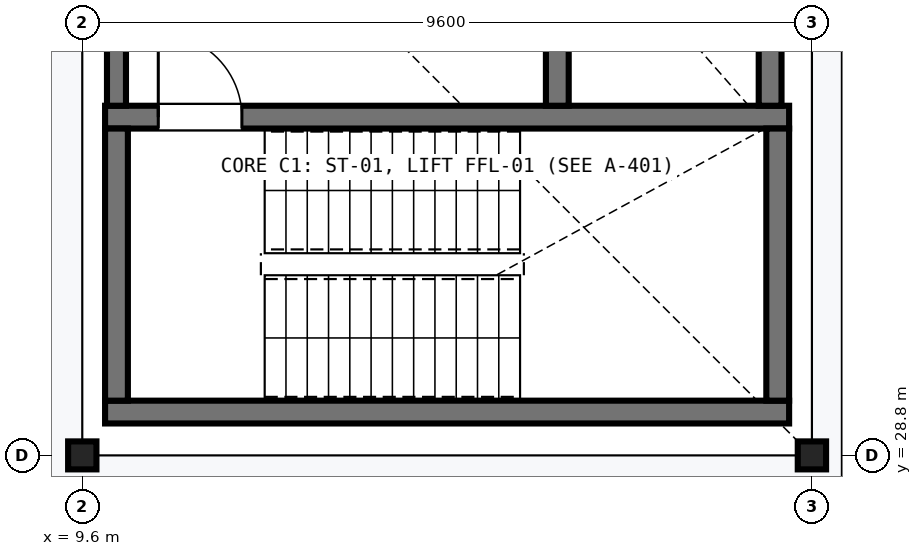
"""IFC4 building model, lengths in metres.
Left out: names, types, materials, properties, quantities, classifications, styles, units other than length and angle.
Written with IfcOpenShell. Run it as: python <this file> out.ifc"""

import sys

from ifc_helpers import new_model, si_unit, direction, frame, frame_2d, origin, origin_2d, place, context, subcontext, project, spatial, rectangle, i_section, extrude, element, fill, save


model = new_model("IFC4")
c1 = context("Model", 3, precision=1e-05, world=origin(), true_north=direction((0.0, 1.0)))
c2 = subcontext(c1, "Body", "Model", "MODEL_VIEW")
j1 = project(units=[si_unit("LENGTHUNIT", "METRE"), si_unit("PLANEANGLEUNIT", "RADIAN")], contexts=[c1])
p1 = place(None, origin())
s1 = spatial("IfcSite", under=j1, at=p1, CompositionType="ELEMENT")
p2 = place(p1, origin())
s2 = spatial("IfcBuilding", under=s1, at=p2, CompositionType="ELEMENT")
p3 = place(p2, frame((0.0, 0.0, 6.0)))
s3 = spatial("IfcBuildingStorey", under=s2, at=p3, CompositionType="ELEMENT", Elevation=6.0)
for number, where, z_axis, x_axis in (
    (1, (9.6, 28.8, 0.0), (0.0, 0.0, 1.0), (1.0, 0.0, 0.0)),
    (2, (19.2, 28.8, 0.0), (0.0, 0.0, 1.0), (1.0, 0.0, 0.0)),
):
    element("IfcColumn", number, at=place(p3, frame(where, z_axis=z_axis, x_axis=x_axis)), inside=s3, PredefinedType="COLUMN", context=c2, shape_type="SweptSolid", body=[
        extrude(i_section(OverallWidth=0.373, OverallDepth=0.368, WebThickness=0.014, FlangeThickness=0.024, FilletRadius=0.015, at=origin_2d()), origin(), (0.0, 0.0, 1.0), 4.25),
    ])
p4 = place(p3, frame((9.9, 29.37, 0.0), z_axis=(0.0, 0.0, 1.0), x_axis=(1.0, 0.0, 0.0)))
e3 = element("IfcWall", 3, at=p4, inside=s3, PredefinedType="SHEAR", context=c2, shape_type="SweptSolid", body=[
    extrude(rectangle(XDim=9.0, YDim=0.3, at=frame_2d((4.5, 0.0))), origin(), (0.0, 0.0, 1.0), 4.25),
])
p5 = place(p3, frame((18.9, 33.25, 0.0), z_axis=(0.0, 0.0, 1.0), x_axis=(-1.0, 0.0, 0.0)))
e4 = element("IfcWall", 4, at=p5, inside=s3, PredefinedType="SHEAR", context=c2, shape_type="SweptSolid", body=[
    extrude(rectangle(XDim=9.0, YDim=0.3, at=frame_2d((4.5, 0.0))), origin(), (0.0, 0.0, 1.0), 4.25),
])
p6 = place(p5, frame((7.2, 0.0, 0.0)))
e5 = element("IfcOpeningElement", 5, at=p6, cuts=e4, PredefinedType="OPENING", context=c2, shape_type="SweptSolid", body=[
    extrude(rectangle(XDim=1.1, YDim=2.15, at=frame_2d((0.55, 1.075))), frame((0.0, 0.16, 0.0), z_axis=(0.0, -1.0, 0.0), x_axis=(1.0, 0.0, 0.0)), (0.0, 0.0, 1.0), 0.32),
])
for number, where, z_axis, x_axis in (
    (6, (10.05, 29.52, 0.0), (0.0, 0.0, 1.0), (0.0, 1.0, 0.0)),
    (7, (18.75, 33.1, 0.0), (0.0, 0.0, 1.0), (0.0, -1.0, 0.0)),
):
    element("IfcWall", number, at=place(p3, frame(where, z_axis=z_axis, x_axis=x_axis)), inside=s3, PredefinedType="SHEAR", context=c2, shape_type="SweptSolid", body=[
        extrude(rectangle(XDim=3.58, YDim=0.3, at=frame_2d((1.79, 0.0))), origin(), (0.0, 0.0, 1.0), 4.25),
    ])
p7 = place(p3, frame((15.85, 36.1, 0.0), z_axis=(0.0, 0.0, 1.0), x_axis=(0.0, -1.0, 0.0)))
e8 = element("IfcWall", 8, at=p7, inside=s3, PredefinedType="SHEAR", context=c2, shape_type="SweptSolid", body=[
    extrude(rectangle(XDim=2.7, YDim=0.3, at=frame_2d((1.35, 0.0))), origin(), (0.0, 0.0, 1.0), 4.25),
])
p8 = place(p7, frame((0.8, 0.0, 0.0)))
e9 = element("IfcOpeningElement", 9, at=p8, cuts=e8, PredefinedType="OPENING", context=c2, shape_type="SweptSolid", body=[
    extrude(rectangle(XDim=1.1, YDim=2.1, at=frame_2d((0.55, 1.05))), frame((0.0, 0.16, 0.0), z_axis=(0.0, -1.0, 0.0), x_axis=(1.0, 0.0, 0.0)), (0.0, 0.0, 1.0), 0.32),
])
p9 = place(p3, frame((18.65, 33.4, 0.0), z_axis=(0.0, 0.0, 1.0), x_axis=(0.0, 1.0, 0.0)))
e10 = element("IfcWall", 10, at=p9, inside=s3, PredefinedType="SHEAR", context=c2, shape_type="SweptSolid", body=[
    extrude(rectangle(XDim=2.7, YDim=0.3, at=frame_2d((1.35, 0.0))), origin(), (0.0, 0.0, 1.0), 4.25),
])
p10 = place(p3, frame((10.05, 33.4, 0.0), z_axis=(0.0, 0.0, 1.0), x_axis=(0.0, 1.0, 0.0)))
e11 = element("IfcWall", 11, at=p10, inside=s3, PredefinedType="SHEAR", context=c2, shape_type="SweptSolid", body=[
    extrude(rectangle(XDim=2.7, YDim=0.25, at=frame_2d((1.35, 0.0))), origin(), (0.0, 0.0, 1.0), 4.25),
])
p11 = place(p10, frame((0.75, 0.0, 0.0)))
e12 = element("IfcOpeningElement", 12, at=p11, cuts=e11, PredefinedType="OPENING", context=c2, shape_type="SweptSolid", body=[
    extrude(rectangle(XDim=1.2, YDim=2.15, at=frame_2d((0.6, 1.075))), frame((0.0, 0.135, 0.0), z_axis=(0.0, -1.0, 0.0), x_axis=(1.0, 0.0, 0.0)), (0.0, 0.0, 1.0), 0.27),
])
p12 = place(p3, frame((19.69, 12.58, 0.0), z_axis=(0.0, 0.0, 1.0), x_axis=(0.0, 1.0, 0.0)))
e13 = element("IfcWall", 13, at=p12, inside=s3, PredefinedType="PARTITIONING", context=c2, shape_type="SweptSolid", body=[
    extrude(rectangle(XDim=25.24, YDim=0.18, at=frame_2d((12.62, 0.0))), origin(), (0.0, 0.0, 1.0), 3.556),
])
p13 = place(p6, frame((1.1, 0.0, 0.0), z_axis=(0.0, 0.0, 1.0), x_axis=(-1.0, 0.0, 0.0)))
e14 = element("IfcDoor", 14, at=p13, inside=s3, OperationType="SINGLE_SWING_RIGHT", PredefinedType="DOOR", context=c2, shape_type="SweptSolid", body=[
    extrude(rectangle(XDim=1.1, YDim=2.15, at=frame_2d((0.55, 1.075))), frame((0.0, 0.025, 0.0), z_axis=(0.0, -1.0, 0.0), x_axis=(1.0, 0.0, 0.0)), (0.0, 0.0, 1.0), 0.05),
])
fill(e5, e14)
save(model, sys.argv[1])
